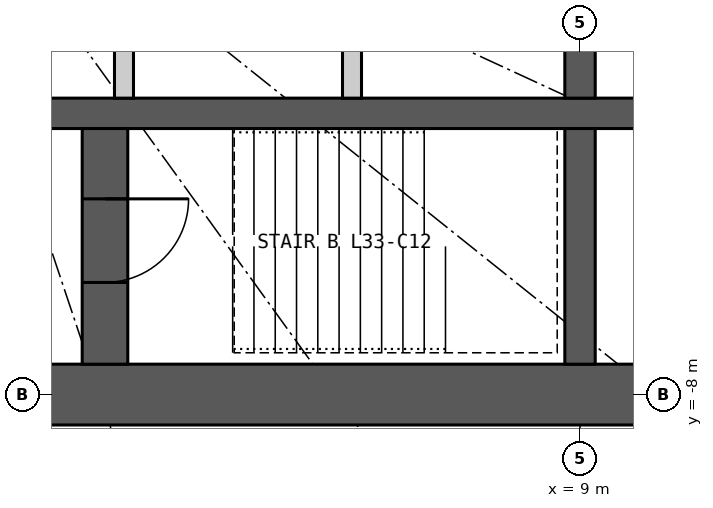
"""IFC4 building model, lengths in metres.
Left out: names, types, materials, properties, quantities, classifications, styles, units other than length and angle.
Written with IfcOpenShell. Run it as: python <this file> out.ifc"""

import sys

from ifc_helpers import new_model, si_unit, direction, frame, frame_2d, origin, place, context, subcontext, project, spatial, rectangle, extrude, element, fill, save


model = new_model("IFC4")
c1 = context("Model", 3, precision=1e-05, world=origin(), true_north=direction((0.0, 1.0)))
c2 = subcontext(c1, "Body", "Model", "MODEL_VIEW")
j1 = project(units=[si_unit("LENGTHUNIT", "METRE"), si_unit("PLANEANGLEUNIT", "RADIAN")], contexts=[c1])
p1 = place(None, origin())
s1 = spatial("IfcSite", under=j1, at=p1, CompositionType="ELEMENT")
p2 = place(p1, origin())
s2 = spatial("IfcBuilding", under=s1, at=p2, CompositionType="ELEMENT")
p3 = place(p2, frame((0.0, 0.0, 128.7)))
s3 = spatial("IfcBuildingStorey", under=s2, at=p3, CompositionType="ELEMENT", Elevation=128.7)
p4 = place(p3, frame((12.4, -8.0, 0.0), z_axis=(0.0, 0.0, 1.0), x_axis=(-1.0, 0.0, 0.0)))
e1 = element("IfcWall", 1, at=p4, inside=s3, PredefinedType="SHEAR", context=c2, shape_type="SweptSolid", body=[
    extrude(rectangle(XDim=24.8, YDim=0.8, at=frame_2d((12.4, 0.0))), origin(), (0.0, 0.0, 1.0), 3.3),
])
p5 = place(p4, frame((11.1, 0.0, 0.0)))
e2 = element("IfcOpeningElement", 2, at=p5, cuts=e1, PredefinedType="OPENING", context=c2, shape_type="SweptSolid", body=[
    extrude(rectangle(XDim=1.2, YDim=2.2, at=frame_2d((0.6, 1.1))), frame((0.0, 0.41, 0.0), z_axis=(0.0, -1.0, 0.0), x_axis=(1.0, 0.0, 0.0)), (0.0, 0.0, 1.0), 0.82),
])
p6 = place(p4, frame((18.7, 0.0, 0.0)))
e3 = element("IfcOpeningElement", 3, at=p6, cuts=e1, PredefinedType="OPENING", context=c2, shape_type="SweptSolid", body=[
    extrude(rectangle(XDim=0.9, YDim=2.2, at=frame_2d((0.45, 1.1))), frame((0.0, 0.41, 0.0), z_axis=(0.0, -1.0, 0.0), x_axis=(1.0, 0.0, 0.0)), (0.0, 0.0, 1.0), 0.82),
])
p7 = place(p3, frame((-11.6, -4.3, 0.0), z_axis=(0.0, 0.0, 1.0), x_axis=(1.0, 0.0, 0.0)))
e4 = element("IfcWall", 4, at=p7, inside=s3, PredefinedType="SHEAR", context=c2, shape_type="SweptSolid", body=[
    extrude(rectangle(XDim=23.2, YDim=0.4, at=frame_2d((11.6, 0.0))), origin(), (0.0, 0.0, 1.0), 3.3),
])
p8 = place(p3, frame((9.0, -4.1, 0.0), z_axis=(0.0, 0.0, 1.0), x_axis=(0.0, 1.0, 0.0)))
e5 = element("IfcWall", 5, at=p8, inside=s3, PredefinedType="SHEAR", context=c2, shape_type="SweptSolid", body=[
    extrude(rectangle(XDim=2.35, YDim=0.4, at=frame_2d((1.175, 0.0))), origin(), (0.0, 0.0, 1.0), 3.3),
])
p9 = place(p3, frame((9.0, -7.6, 0.0), z_axis=(0.0, 0.0, 1.0), x_axis=(0.0, 1.0, 0.0)))
e6 = element("IfcWall", 6, at=p9, inside=s3, PredefinedType="SHEAR", context=c2, shape_type="SweptSolid", body=[
    extrude(rectangle(XDim=3.1, YDim=0.4, at=frame_2d((1.55, 0.0))), origin(), (0.0, 0.0, 1.0), 3.3),
])
p10 = place(p3, frame((2.75, -7.6, 0.0), z_axis=(0.0, 0.0, 1.0), x_axis=(0.0, 1.0, 0.0)))
e7 = element("IfcWall", 7, at=p10, inside=s3, PredefinedType="SHEAR", context=c2, shape_type="SweptSolid", body=[
    extrude(rectangle(XDim=3.1, YDim=0.6, at=frame_2d((1.55, 0.0))), origin(), (0.0, 0.0, 1.0), 3.3),
])
p11 = place(p10, frame((1.075, 0.0, 0.0)))
e8 = element("IfcOpeningElement", 8, at=p11, cuts=e7, PredefinedType="OPENING", context=c2, shape_type="SweptSolid", body=[
    extrude(rectangle(XDim=1.1, YDim=2.2, at=frame_2d((0.55, 1.1))), frame((0.0, 0.31, 0.0), z_axis=(0.0, -1.0, 0.0), x_axis=(1.0, 0.0, 0.0)), (0.0, 0.0, 1.0), 0.62),
])
for number, where, z_axis, x_axis in (
    (9, (3.0, -4.1, 0.0), (0.0, 0.0, 1.0), (0.0, 1.0, 0.0)),
    (10, (6.0, -4.1, 0.0), (0.0, 0.0, 1.0), (0.0, 1.0, 0.0)),
):
    element("IfcWall", number, at=place(p3, frame(where, z_axis=z_axis, x_axis=x_axis)), inside=s3, PredefinedType="PARTITIONING", context=c2, shape_type="SweptSolid", body=[
        extrude(rectangle(XDim=2.35, YDim=0.25, at=frame_2d((1.175, 0.0))), origin(), (0.0, 0.0, 1.0), 3.3),
    ])
p12 = place(p11, origin())
e11 = element("IfcDoor", 11, at=p12, inside=s3, OperationType="SINGLE_SWING_RIGHT", PredefinedType="DOOR", context=c2, shape_type="SweptSolid", body=[
    extrude(rectangle(XDim=1.1, YDim=2.2, at=frame_2d((0.55, 1.1))), frame((0.0, 0.025, 0.0), z_axis=(0.0, -1.0, 0.0), x_axis=(1.0, 0.0, 0.0)), (0.0, 0.0, 1.0), 0.05),
])
fill(e8, e11)
save(model, sys.argv[1])
